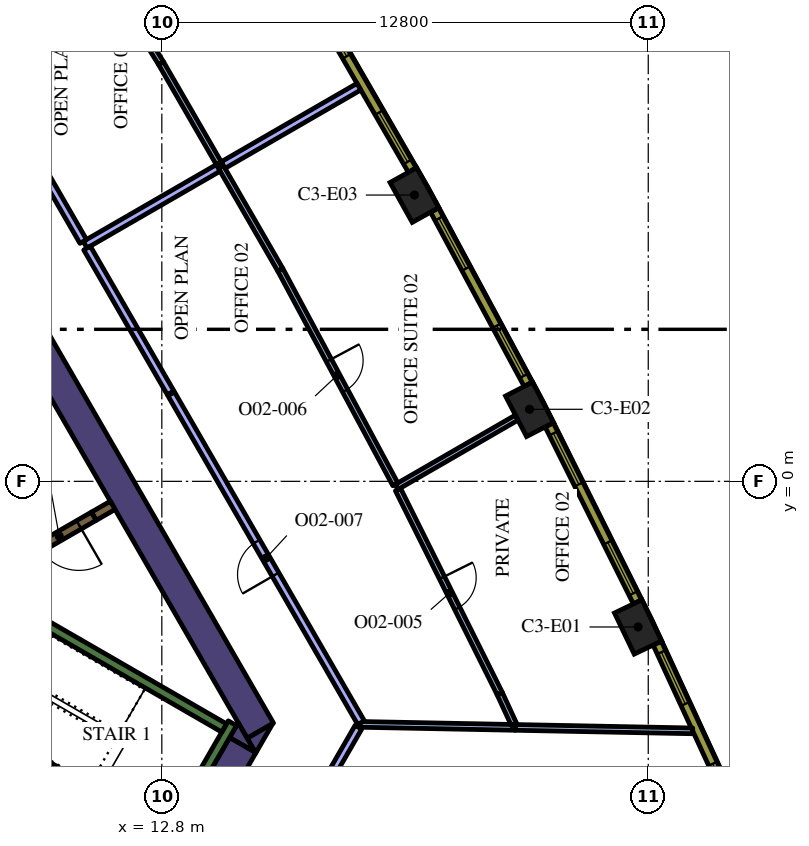
"""IFC4 building model, lengths in metres.
Left out: names, types, materials, properties, quantities, classifications, styles, units other than length and angle.
Written with IfcOpenShell. Run it as: python <this file> out.ifc"""

import sys

from ifc_helpers import new_model, si_unit, direction, frame, frame_2d, origin, origin_2d, place, context, subcontext, project, spatial, polyline, rectangle, outline, extrude, element, fill, save


model = new_model("IFC4")
c1 = context("Model", 3, precision=1e-05, world=origin(), true_north=direction((0.0, 1.0)))
c2 = subcontext(c1, "Body", "Model", "MODEL_VIEW")
j1 = project(units=[si_unit("LENGTHUNIT", "METRE"), si_unit("PLANEANGLEUNIT", "RADIAN")], contexts=[c1])
p1 = place(None, origin())
s1 = spatial("IfcSite", under=j1, at=p1, CompositionType="ELEMENT")
p2 = place(p1, origin())
s2 = spatial("IfcBuilding", under=s1, at=p2, CompositionType="ELEMENT")
p3 = place(p2, frame((0.0, 0.0, 162.6)))
s3 = spatial("IfcBuildingStorey", under=s2, at=p3, CompositionType="ELEMENT", Elevation=162.6)
for number, where, z_axis, x_axis in (
    (1, (25.332, -3.832, 0.0), (0.0, 0.0, 1.0), (-0.433, 0.902, 0.0)),
    (2, (22.476, 1.896, 0.0), (0.0, 0.0, 1.0), (-0.46, 0.888, 0.0)),
    (3, (19.447, 7.533, 0.0), (0.0, 0.0, 1.0), (-0.487, 0.874, 0.0)),
):
    element("IfcColumn", number, at=place(p3, frame(where, z_axis=z_axis, x_axis=x_axis)), inside=s3, PredefinedType="COLUMN", context=c2, shape_type="SweptSolid", body=[
        extrude(rectangle(XDim=1.2, YDim=0.8, at=origin_2d()), origin(), (0.0, 0.0, 1.0), 4.2),
    ])
p4 = place(p3, frame((9.129, 4.289, 0.0), z_axis=(0.0, 0.0, 1.0), x_axis=(0.499995742806, -0.866027861663, 0.0)))
e4 = element("IfcWall", 4, at=p4, inside=s3, PredefinedType="SOLIDWALL", context=c2, shape_type="SweptSolid", body=[
    extrude(rectangle(XDim=12.527, YDim=0.8, at=frame_2d((6.264, 0.0))), origin(), (0.0, 0.0, 1.0), 4.2),
])
p5 = place(p3, origin())
e5 = element("IfcWall", 5, at=p5, inside=s3, PredefinedType="SOLIDWALL", context=c2, shape_type="SweptSolid", body=[
    extrude(outline(polyline([(15.271, -7.15), (15.047, -6.762), (15.719, -6.374), (15.271, -7.15)])), origin(), (0.0, 0.0, 1.0), 4.2),
])
p6 = place(p3, frame((13.018, -10.252, 0.0), z_axis=(0.0, 0.0, 1.0), x_axis=(0.499984020225, 0.866034629516, 0.0)))
e6 = element("IfcWall", 6, at=p6, inside=s3, PredefinedType="SOLIDWALL", context=c2, shape_type="SweptSolid", body=[
    extrude(rectangle(XDim=3.824, YDim=0.8, at=frame_2d((1.912, 0.0))), origin(), (0.0, 0.0, 1.0), 4.2),
])
e7 = element("IfcWall", 7, at=p5, inside=s3, PredefinedType="SOLIDWALL", context=c2, shape_type="SweptSolid", body=[
    extrude(outline(polyline([(14.809, -6.35), (15.257, -7.126), (14.585, -6.738), (14.809, -6.35)])), origin(), (0.0, 0.0, 1.0), 4.2),
])
p7 = place(p3, frame((12.84, -9.511, 0.0), z_axis=(0.0, 0.0, 1.0), x_axis=(0.499997733992, 0.866026712061, 0.0)))
e8 = element("IfcWall", 8, at=p7, inside=s3, PredefinedType="SOLIDWALL", context=c2, shape_type="SweptSolid", body=[
    extrude(rectangle(XDim=3.634, YDim=0.25, at=frame_2d((1.817, 0.0))), origin(), (0.0, 0.0, 1.0), 4.2),
])
p8 = place(p3, frame((12.84, -9.261, 0.0), z_axis=(0.0, 0.0, 1.0), x_axis=(-0.866013990052, 0.500019768644, 0.0)))
e9 = element("IfcWall", 9, at=p8, inside=s3, PredefinedType="SOLIDWALL", context=c2, shape_type="SweptSolid", body=[
    extrude(rectangle(XDim=6.8, YDim=0.25, at=frame_2d((3.4, 0.0))), origin(), (0.0, 0.0, 1.0), 4.2),
])
p9 = place(p3, frame((8.334, -2.964, 0.0), z_axis=(0.0, 0.0, 1.0), x_axis=(0.866016039709, -0.500016218704, 0.0)))
e10 = element("IfcWall", 10, at=p9, inside=s3, PredefinedType="SOLIDWALL", context=c2, shape_type="SweptSolid", body=[
    extrude(rectangle(XDim=7.05, YDim=0.25, at=frame_2d((3.525, 0.0))), origin(), (0.0, 0.0, 1.0), 4.2),
])
p10 = place(p3, frame((11.507, -0.631, 0.0), z_axis=(0.0, 0.0, 1.0), x_axis=(-0.866093731455, -0.499881634324, 0.0)))
e11 = element("IfcWall", 11, at=p10, inside=s3, PredefinedType="SOLIDWALL", context=c2, shape_type="SweptSolid", body=[
    extrude(rectangle(XDim=0.575, YDim=0.25, at=frame_2d((0.288, 0.0))), origin(), (0.0, 0.0, 1.0), 4.2),
])
p11 = place(p3, frame((11.009, -0.919, 0.0), z_axis=(0.0, 0.0, 1.0), x_axis=(-0.866059744384, -0.49994051562, 0.0)))
e12 = element("IfcWall", 12, at=p11, inside=s3, PredefinedType="SOLIDWALL", context=c2, shape_type="SweptSolid", body=[
    extrude(rectangle(XDim=2.1, YDim=0.25, at=frame_2d((1.05, 0.0))), origin(), (0.0, 0.0, 1.0), 4.2),
])
p12 = place(p11, frame((0.45, 0.0, 0.0)))
e13 = element("IfcOpeningElement", 13, at=p12, cuts=e12, PredefinedType="OPENING", context=c2, shape_type="SweptSolid", body=[
    extrude(rectangle(XDim=1.2, YDim=2.1, at=frame_2d((0.6, 1.05))), frame((0.0, 0.135, 0.0), z_axis=(0.0, -1.0, 0.0), x_axis=(1.0, 0.0, 0.0)), (0.0, 0.0, 1.0), 0.27),
])
p13 = place(p3, frame((22.097, -6.474, 0.0), z_axis=(0.0, 0.0, 1.0), x_axis=(0.999810044283, -0.019490391268, 0.0)))
e14 = element("IfcWall", 14, at=p13, inside=s3, PredefinedType="PARTITIONING", context=c2, shape_type="SweptSolid", body=[
    extrude(rectangle(XDim=4.672, YDim=0.15, at=frame_2d((2.336, 0.0))), origin(), (0.0, 0.0, 1.0), 3.15),
])
p14 = place(p3, frame((18.016, -6.395, 0.0), z_axis=(0.0, 0.0, 1.0), x_axis=(0.999808348885, -0.019577167837, 0.0)))
e15 = element("IfcWall", 15, at=p14, inside=s3, PredefinedType="PARTITIONING", context=c2, shape_type="SweptSolid", body=[
    extrude(rectangle(XDim=4.09, YDim=0.15, at=frame_2d((2.045, 0.0))), origin(), (0.0, 0.0, 1.0), 3.15),
])
p15 = place(p3, frame((16.896, -8.335, 0.0), z_axis=(0.0, 0.0, 1.0), x_axis=(0.500026504619, 0.866010100794, 0.0)))
e16 = element("IfcWall", 16, at=p15, inside=s3, PredefinedType="PARTITIONING", context=c2, shape_type="SweptSolid", body=[
    extrude(rectangle(XDim=2.155, YDim=0.2, at=frame_2d((1.077, 0.0))), origin(), (0.0, 0.0, 1.0), 3.15),
])
p16 = place(p3, frame((18.98, -0.147, 0.0), z_axis=(0.0, 0.0, 1.0), x_axis=(0.866035116605, 0.499983176524, 0.0)))
e17 = element("IfcWall", 17, at=p16, inside=s3, PredefinedType="PARTITIONING", context=c2, shape_type="SweptSolid", body=[
    extrude(rectangle(XDim=3.648, YDim=0.15, at=frame_2d((1.824, 0.0))), origin(), (0.0, 0.0, 1.0), 3.15),
])
p17 = place(p3, frame((22.067, -6.399, 0.0), z_axis=(0.0, 0.0, 1.0), x_axis=(-0.418629119493, 0.908157288311, 0.0)))
e18 = element("IfcWall", 18, at=p17, inside=s3, PredefinedType="PARTITIONING", context=c2, shape_type="SweptSolid", body=[
    extrude(rectangle(XDim=0.902, YDim=0.15, at=frame_2d((0.451, 0.0))), origin(), (0.0, 0.0, 1.0), 3.15),
])
p18 = place(p3, frame((19.014, -0.214, 0.0), z_axis=(0.0, 0.0, 1.0), x_axis=(0.446219729364, -0.894923434225, 0.0)))
e19 = element("IfcWall", 19, at=p18, inside=s3, PredefinedType="PARTITIONING", context=c2, shape_type="SweptSolid", body=[
    extrude(rectangle(XDim=5.995, YDim=0.15, at=frame_2d((2.998, 0.0))), origin(), (0.0, 0.0, 1.0), 3.15),
])
p19 = place(p18, frame((2.595, 0.0, 0.0)))
e20 = element("IfcOpeningElement", 20, at=p19, cuts=e19, PredefinedType="OPENING", context=c2, shape_type="SweptSolid", body=[
    extrude(rectangle(XDim=0.9, YDim=2.1, at=frame_2d((0.45, 1.05))), frame((0.0, 0.085, 0.0), z_axis=(0.0, -1.0, 0.0), x_axis=(1.0, 0.0, 0.0)), (0.0, 0.0, 1.0), 0.17),
])
p20 = place(p3, frame((15.917, 5.566, 0.0), z_axis=(0.0, 0.0, 1.0), x_axis=(0.472485737981, -0.881338316088, 0.0)))
e21 = element("IfcWall", 21, at=p20, inside=s3, PredefinedType="PARTITIONING", context=c2, shape_type="SweptSolid", body=[
    extrude(rectangle(XDim=6.407, YDim=0.15, at=frame_2d((3.204, 0.0))), origin(), (0.0, 0.0, 1.0), 3.15),
])
p21 = place(p20, frame((2.707, 0.0, 0.0)))
e22 = element("IfcOpeningElement", 22, at=p21, cuts=e21, PredefinedType="OPENING", context=c2, shape_type="SweptSolid", body=[
    extrude(rectangle(XDim=0.9, YDim=2.1, at=frame_2d((0.45, 1.05))), frame((0.0, 0.085, 0.0), z_axis=(0.0, -1.0, 0.0), x_axis=(1.0, 0.0, 0.0)), (0.0, 0.0, 1.0), 0.17),
])
p22 = place(p3, frame((15.917, 5.566, 0.0), z_axis=(0.0, 0.0, 1.0), x_axis=(-0.499996312652, 0.866027532665, 0.0)))
e23 = element("IfcWall", 23, at=p22, inside=s3, PredefinedType="PARTITIONING", context=c2, shape_type="SweptSolid", body=[
    extrude(rectangle(XDim=3.138, YDim=0.15, at=frame_2d((1.569, 0.0))), origin(), (0.0, 0.0, 1.0), 3.15),
])
p23 = place(p3, frame((14.413, 8.322, 0.0), z_axis=(0.0, 0.0, 1.0), x_axis=(0.866034795751, 0.499983732284, 0.0)))
e24 = element("IfcWall", 24, at=p23, inside=s3, PredefinedType="PARTITIONING", context=c2, shape_type="SweptSolid", body=[
    extrude(rectangle(XDim=4.125, YDim=0.2, at=frame_2d((2.062, 0.0))), origin(), (0.0, 0.0, 1.0), 3.15),
])
p24 = place(p3, frame((10.782, 6.225, 0.0), z_axis=(0.0, 0.0, 1.0), x_axis=(0.866034752867, 0.499983806564, 0.0)))
e25 = element("IfcWall", 25, at=p24, inside=s3, PredefinedType="PARTITIONING", context=c2, shape_type="SweptSolid", body=[
    extrude(rectangle(XDim=4.043, YDim=0.2, at=frame_2d((2.021, 0.0))), origin(), (0.0, 0.0, 1.0), 3.15),
])
p25 = place(p3, frame((13.032, 2.328, 0.0), z_axis=(0.0, 0.0, 1.0), x_axis=(-0.499988222896, 0.866032203192, 0.0)))
e26 = element("IfcWall", 26, at=p25, inside=s3, PredefinedType="PARTITIONING", context=c2, shape_type="SweptSolid", body=[
    extrude(rectangle(XDim=4.4, YDim=0.2, at=frame_2d((2.2, 0.0))), origin(), (0.0, 0.0, 1.0), 3.15),
])
p26 = place(p3, frame((18.042, -6.35, 0.0), z_axis=(0.0, 0.0, 1.0), x_axis=(-0.499986873641, 0.866032982159, 0.0)))
e27 = element("IfcWall", 27, at=p26, inside=s3, PredefinedType="PARTITIONING", context=c2, shape_type="SweptSolid", body=[
    extrude(rectangle(XDim=9.99, YDim=0.2, at=frame_2d((4.995, 0.0))), origin(), (0.0, 0.0, 1.0), 3.15),
])
p27 = place(p26, frame((4.5, 0.0, 0.0)))
e28 = element("IfcOpeningElement", 28, at=p27, cuts=e27, PredefinedType="OPENING", context=c2, shape_type="SweptSolid", body=[
    extrude(rectangle(XDim=1.0, YDim=2.1, at=frame_2d((0.5, 1.05))), frame((0.0, 0.11, 0.0), z_axis=(0.0, -1.0, 0.0), x_axis=(1.0, 0.0, 0.0)), (0.0, 0.0, 1.0), 0.22),
])
p28 = place(p3, frame((14.299, 8.371, 0.0), z_axis=(0.0, 0.0, 1.0), x_axis=(-0.500019211527, 0.86601431172, 0.0)))
e29 = element("IfcWall", 29, at=p28, inside=s3, PredefinedType="PARTITIONING", context=c2, shape_type="SweptSolid", body=[
    extrude(rectangle(XDim=3.039, YDim=0.15, at=frame_2d((1.519, 0.0))), origin(), (0.0, 0.0, 1.0), 3.15),
])
p29 = place(p3, frame((9.403, 16.447, 0.0), z_axis=(0.0, 0.0, 1.0), x_axis=(0.527026092571, -0.849849102929, 0.0)))
e30 = element("IfcWall", 30, at=p29, inside=s3, PredefinedType="PARTITIONING", context=c2, shape_type="SweptSolid", body=[
    extrude(rectangle(XDim=6.407, YDim=0.15, at=frame_2d((3.204, 0.0))), origin(), (0.0, 0.0, 1.0), 3.15),
])
p30 = place(p29, frame((2.707, 0.0, 0.0)))
e31 = element("IfcOpeningElement", 31, at=p30, cuts=e30, PredefinedType="OPENING", context=c2, shape_type="SweptSolid", body=[
    extrude(rectangle(XDim=0.9, YDim=2.1, at=frame_2d((0.45, 1.05))), frame((0.0, 0.085, 0.0), z_axis=(0.0, -1.0, 0.0), x_axis=(1.0, 0.0, 0.0)), (0.0, 0.0, 1.0), 0.17),
])
p31 = place(p3, frame((10.732, 6.312, 0.0), z_axis=(0.0, 0.0, 1.0), x_axis=(-0.499984786451, 0.866034187153, 0.0)))
e32 = element("IfcWall", 32, at=p31, inside=s3, PredefinedType="PARTITIONING", context=c2, shape_type="SweptSolid", body=[
    extrude(rectangle(XDim=4.404, YDim=0.2, at=frame_2d((2.202, 0.0))), origin(), (0.0, 0.0, 1.0), 3.15),
])
p32 = place(p3, frame((28.02, -8.992, 0.0), z_axis=(0.0, 0.0, 1.0), x_axis=(-0.418722559465, 0.908114209885, 0.0)))
e33 = element("IfcWall", 33, at=p32, inside=s3, PredefinedType="SOLIDWALL", context=c2, shape_type="SweptSolid", body=[
    extrude(rectangle(XDim=5.213, YDim=0.24, at=frame_2d((2.606, 0.0))), origin(), (0.0, 0.0, 1.0), 3.95),
])
p33 = place(p32, frame((0.221, 0.0, 0.9)))
e34 = element("IfcOpeningElement", 34, at=p33, cuts=e33, PredefinedType="OPENING", context=c2, shape_type="SweptSolid", body=[
    extrude(rectangle(XDim=1.5, YDim=2.55, at=frame_2d((0.75, 1.275))), frame((0.0, 0.13, 0.0), z_axis=(0.0, -1.0, 0.0), x_axis=(1.0, 0.0, 0.0)), (0.0, 0.0, 1.0), 0.26),
])
p34 = place(p32, frame((3.452, 0.0, 0.9)))
e35 = element("IfcOpeningElement", 35, at=p34, cuts=e33, PredefinedType="OPENING", context=c2, shape_type="SweptSolid", body=[
    extrude(rectangle(XDim=1.5, YDim=2.55, at=frame_2d((0.75, 1.275))), frame((0.0, 0.13, 0.0), z_axis=(0.0, -1.0, 0.0), x_axis=(1.0, 0.0, 0.0)), (0.0, 0.0, 1.0), 0.26),
])
p35 = place(p3, frame((25.316, -3.171, 0.0), z_axis=(0.0, 0.0, 1.0), x_axis=(-0.446256171312, 0.8949052629, 0.0)))
e36 = element("IfcWall", 36, at=p35, inside=s3, PredefinedType="SOLIDWALL", context=c2, shape_type="SweptSolid", body=[
    extrude(rectangle(XDim=5.203, YDim=0.24, at=frame_2d((2.602, 0.0))), origin(), (0.0, 0.0, 1.0), 3.95),
])
p36 = place(p35, frame((0.248, 0.0, 0.9)))
e37 = element("IfcOpeningElement", 37, at=p36, cuts=e36, PredefinedType="OPENING", context=c2, shape_type="SweptSolid", body=[
    extrude(rectangle(XDim=1.5, YDim=2.55, at=frame_2d((0.75, 1.275))), frame((0.0, 0.13, 0.0), z_axis=(0.0, -1.0, 0.0), x_axis=(1.0, 0.0, 0.0)), (0.0, 0.0, 1.0), 0.26),
])
p37 = place(p35, frame((3.455, 0.0, 0.9)))
e38 = element("IfcOpeningElement", 38, at=p37, cuts=e36, PredefinedType="OPENING", context=c2, shape_type="SweptSolid", body=[
    extrude(rectangle(XDim=1.5, YDim=2.55, at=frame_2d((0.75, 1.275))), frame((0.0, 0.13, 0.0), z_axis=(0.0, -1.0, 0.0), x_axis=(1.0, 0.0, 0.0)), (0.0, 0.0, 1.0), 0.26),
])
p38 = place(p3, frame((22.44, 2.555, 0.0), z_axis=(0.0, 0.0, 1.0), x_axis=(-0.473349833294, 0.880874528704, 0.0)))
e39 = element("IfcWall", 39, at=p38, inside=s3, PredefinedType="SOLIDWALL", context=c2, shape_type="SweptSolid", body=[
    extrude(rectangle(XDim=5.204, YDim=0.24, at=frame_2d((2.602, 0.0))), origin(), (0.0, 0.0, 1.0), 3.95),
])
p39 = place(p38, frame((0.248, 0.0, 0.9)))
e40 = element("IfcOpeningElement", 40, at=p39, cuts=e39, PredefinedType="OPENING", context=c2, shape_type="SweptSolid", body=[
    extrude(rectangle(XDim=1.5, YDim=2.55, at=frame_2d((0.75, 1.275))), frame((0.0, 0.13, 0.0), z_axis=(0.0, -1.0, 0.0), x_axis=(1.0, 0.0, 0.0)), (0.0, 0.0, 1.0), 0.26),
])
p40 = place(p38, frame((3.455, 0.0, 0.9)))
e41 = element("IfcOpeningElement", 41, at=p40, cuts=e39, PredefinedType="OPENING", context=c2, shape_type="SweptSolid", body=[
    extrude(rectangle(XDim=1.5, YDim=2.55, at=frame_2d((0.75, 1.275))), frame((0.0, 0.13, 0.0), z_axis=(0.0, -1.0, 0.0), x_axis=(1.0, 0.0, 0.0)), (0.0, 0.0, 1.0), 0.26),
])
p41 = place(p3, frame((19.391, 8.191, 0.0), z_axis=(0.0, 0.0, 1.0), x_axis=(-0.500009456303, 0.866019944116, 0.0)))
e42 = element("IfcWall", 42, at=p41, inside=s3, PredefinedType="SOLIDWALL", context=c2, shape_type="SweptSolid", body=[
    extrude(rectangle(XDim=5.204, YDim=0.24, at=frame_2d((2.602, 0.0))), origin(), (0.0, 0.0, 1.0), 3.95),
])
p42 = place(p41, frame((0.248, 0.0, 0.9)))
e43 = element("IfcOpeningElement", 43, at=p42, cuts=e42, PredefinedType="OPENING", context=c2, shape_type="SweptSolid", body=[
    extrude(rectangle(XDim=1.5, YDim=2.55, at=frame_2d((0.75, 1.275))), frame((0.0, 0.13, 0.0), z_axis=(0.0, -1.0, 0.0), x_axis=(1.0, 0.0, 0.0)), (0.0, 0.0, 1.0), 0.26),
])
p43 = place(p41, frame((3.455, 0.0, 0.9)))
e44 = element("IfcOpeningElement", 44, at=p43, cuts=e42, PredefinedType="OPENING", context=c2, shape_type="SweptSolid", body=[
    extrude(rectangle(XDim=1.5, YDim=2.55, at=frame_2d((0.75, 1.275))), frame((0.0, 0.13, 0.0), z_axis=(0.0, -1.0, 0.0), x_axis=(1.0, 0.0, 0.0)), (0.0, 0.0, 1.0), 0.26),
])
p44 = place(p12, origin())
e45 = element("IfcDoor", 45, at=p44, inside=s3, OperationType="SINGLE_SWING_LEFT", PredefinedType="DOOR", context=c2, shape_type="SweptSolid", body=[
    extrude(rectangle(XDim=1.2, YDim=2.1, at=frame_2d((0.6, 1.05))), frame((0.0, 0.025, 0.0), z_axis=(0.0, -1.0, 0.0), x_axis=(1.0, 0.0, 0.0)), (0.0, 0.0, 1.0), 0.05),
])
fill(e13, e45)
p45 = place(p19, origin())
e46 = element("IfcDoor", 46, at=p45, inside=s3, OperationType="SINGLE_SWING_RIGHT", PredefinedType="DOOR", context=c2, shape_type="SweptSolid", body=[
    extrude(rectangle(XDim=0.9, YDim=2.1, at=frame_2d((0.45, 1.05))), frame((0.0, 0.025, 0.0), z_axis=(0.0, -1.0, 0.0), x_axis=(1.0, 0.0, 0.0)), (0.0, 0.0, 1.0), 0.05),
])
fill(e20, e46)
p46 = place(p21, origin())
e47 = element("IfcDoor", 47, at=p46, inside=s3, OperationType="SINGLE_SWING_LEFT", PredefinedType="DOOR", context=c2, shape_type="SweptSolid", body=[
    extrude(rectangle(XDim=0.9, YDim=2.1, at=frame_2d((0.45, 1.05))), frame((0.0, 0.025, 0.0), z_axis=(0.0, -1.0, 0.0), x_axis=(1.0, 0.0, 0.0)), (0.0, 0.0, 1.0), 0.05),
])
fill(e22, e47)
p47 = place(p27, origin())
e48 = element("IfcDoor", 48, at=p47, inside=s3, OperationType="SINGLE_SWING_RIGHT", PredefinedType="DOOR", context=c2, shape_type="SweptSolid", body=[
    extrude(rectangle(XDim=1.0, YDim=2.1, at=frame_2d((0.5, 1.05))), frame((0.0, 0.025, 0.0), z_axis=(0.0, -1.0, 0.0), x_axis=(1.0, 0.0, 0.0)), (0.0, 0.0, 1.0), 0.05),
])
fill(e28, e48)
p48 = place(p33, origin())
e49 = element("IfcWindow", 49, at=p48, inside=s3, PartitioningType="SINGLE_PANEL", PredefinedType="WINDOW", context=c2, shape_type="SweptSolid", body=[
    extrude(rectangle(XDim=1.5, YDim=2.55, at=frame_2d((0.75, 1.275))), frame((0.0, 0.04, 0.0), z_axis=(0.0, -1.0, 0.0), x_axis=(1.0, 0.0, 0.0)), (0.0, 0.0, 1.0), 0.06),
])
fill(e34, e49)
p49 = place(p34, origin())
e50 = element("IfcWindow", 50, at=p49, inside=s3, PartitioningType="SINGLE_PANEL", PredefinedType="WINDOW", context=c2, shape_type="SweptSolid", body=[
    extrude(rectangle(XDim=1.5, YDim=2.55, at=frame_2d((0.75, 1.275))), frame((0.0, 0.04, 0.0), z_axis=(0.0, -1.0, 0.0), x_axis=(1.0, 0.0, 0.0)), (0.0, 0.0, 1.0), 0.06),
])
fill(e35, e50)
p50 = place(p36, origin())
e51 = element("IfcWindow", 51, at=p50, inside=s3, PartitioningType="SINGLE_PANEL", PredefinedType="WINDOW", context=c2, shape_type="SweptSolid", body=[
    extrude(rectangle(XDim=1.5, YDim=2.55, at=frame_2d((0.75, 1.275))), frame((0.0, 0.04, 0.0), z_axis=(0.0, -1.0, 0.0), x_axis=(1.0, 0.0, 0.0)), (0.0, 0.0, 1.0), 0.06),
])
fill(e37, e51)
p51 = place(p37, origin())
e52 = element("IfcWindow", 52, at=p51, inside=s3, PartitioningType="SINGLE_PANEL", PredefinedType="WINDOW", context=c2, shape_type="SweptSolid", body=[
    extrude(rectangle(XDim=1.5, YDim=2.55, at=frame_2d((0.75, 1.275))), frame((0.0, 0.04, 0.0), z_axis=(0.0, -1.0, 0.0), x_axis=(1.0, 0.0, 0.0)), (0.0, 0.0, 1.0), 0.06),
])
fill(e38, e52)
p52 = place(p39, origin())
e53 = element("IfcWindow", 53, at=p52, inside=s3, PartitioningType="SINGLE_PANEL", PredefinedType="WINDOW", context=c2, shape_type="SweptSolid", body=[
    extrude(rectangle(XDim=1.5, YDim=2.55, at=frame_2d((0.75, 1.275))), frame((0.0, 0.04, 0.0), z_axis=(0.0, -1.0, 0.0), x_axis=(1.0, 0.0, 0.0)), (0.0, 0.0, 1.0), 0.06),
])
fill(e40, e53)
p53 = place(p40, origin())
e54 = element("IfcWindow", 54, at=p53, inside=s3, PartitioningType="SINGLE_PANEL", PredefinedType="WINDOW", context=c2, shape_type="SweptSolid", body=[
    extrude(rectangle(XDim=1.5, YDim=2.55, at=frame_2d((0.75, 1.275))), frame((0.0, 0.04, 0.0), z_axis=(0.0, -1.0, 0.0), x_axis=(1.0, 0.0, 0.0)), (0.0, 0.0, 1.0), 0.06),
])
fill(e41, e54)
p54 = place(p42, origin())
e55 = element("IfcWindow", 55, at=p54, inside=s3, PartitioningType="SINGLE_PANEL", PredefinedType="WINDOW", context=c2, shape_type="SweptSolid", body=[
    extrude(rectangle(XDim=1.5, YDim=2.55, at=frame_2d((0.75, 1.275))), frame((0.0, 0.04, 0.0), z_axis=(0.0, -1.0, 0.0), x_axis=(1.0, 0.0, 0.0)), (0.0, 0.0, 1.0), 0.06),
])
fill(e43, e55)
p55 = place(p43, origin())
e56 = element("IfcWindow", 56, at=p55, inside=s3, PartitioningType="SINGLE_PANEL", PredefinedType="WINDOW", context=c2, shape_type="SweptSolid", body=[
    extrude(rectangle(XDim=1.5, YDim=2.55, at=frame_2d((0.75, 1.275))), frame((0.0, 0.04, 0.0), z_axis=(0.0, -1.0, 0.0), x_axis=(1.0, 0.0, 0.0)), (0.0, 0.0, 1.0), 0.06),
])
fill(e44, e56)
save(model, sys.argv[1])
